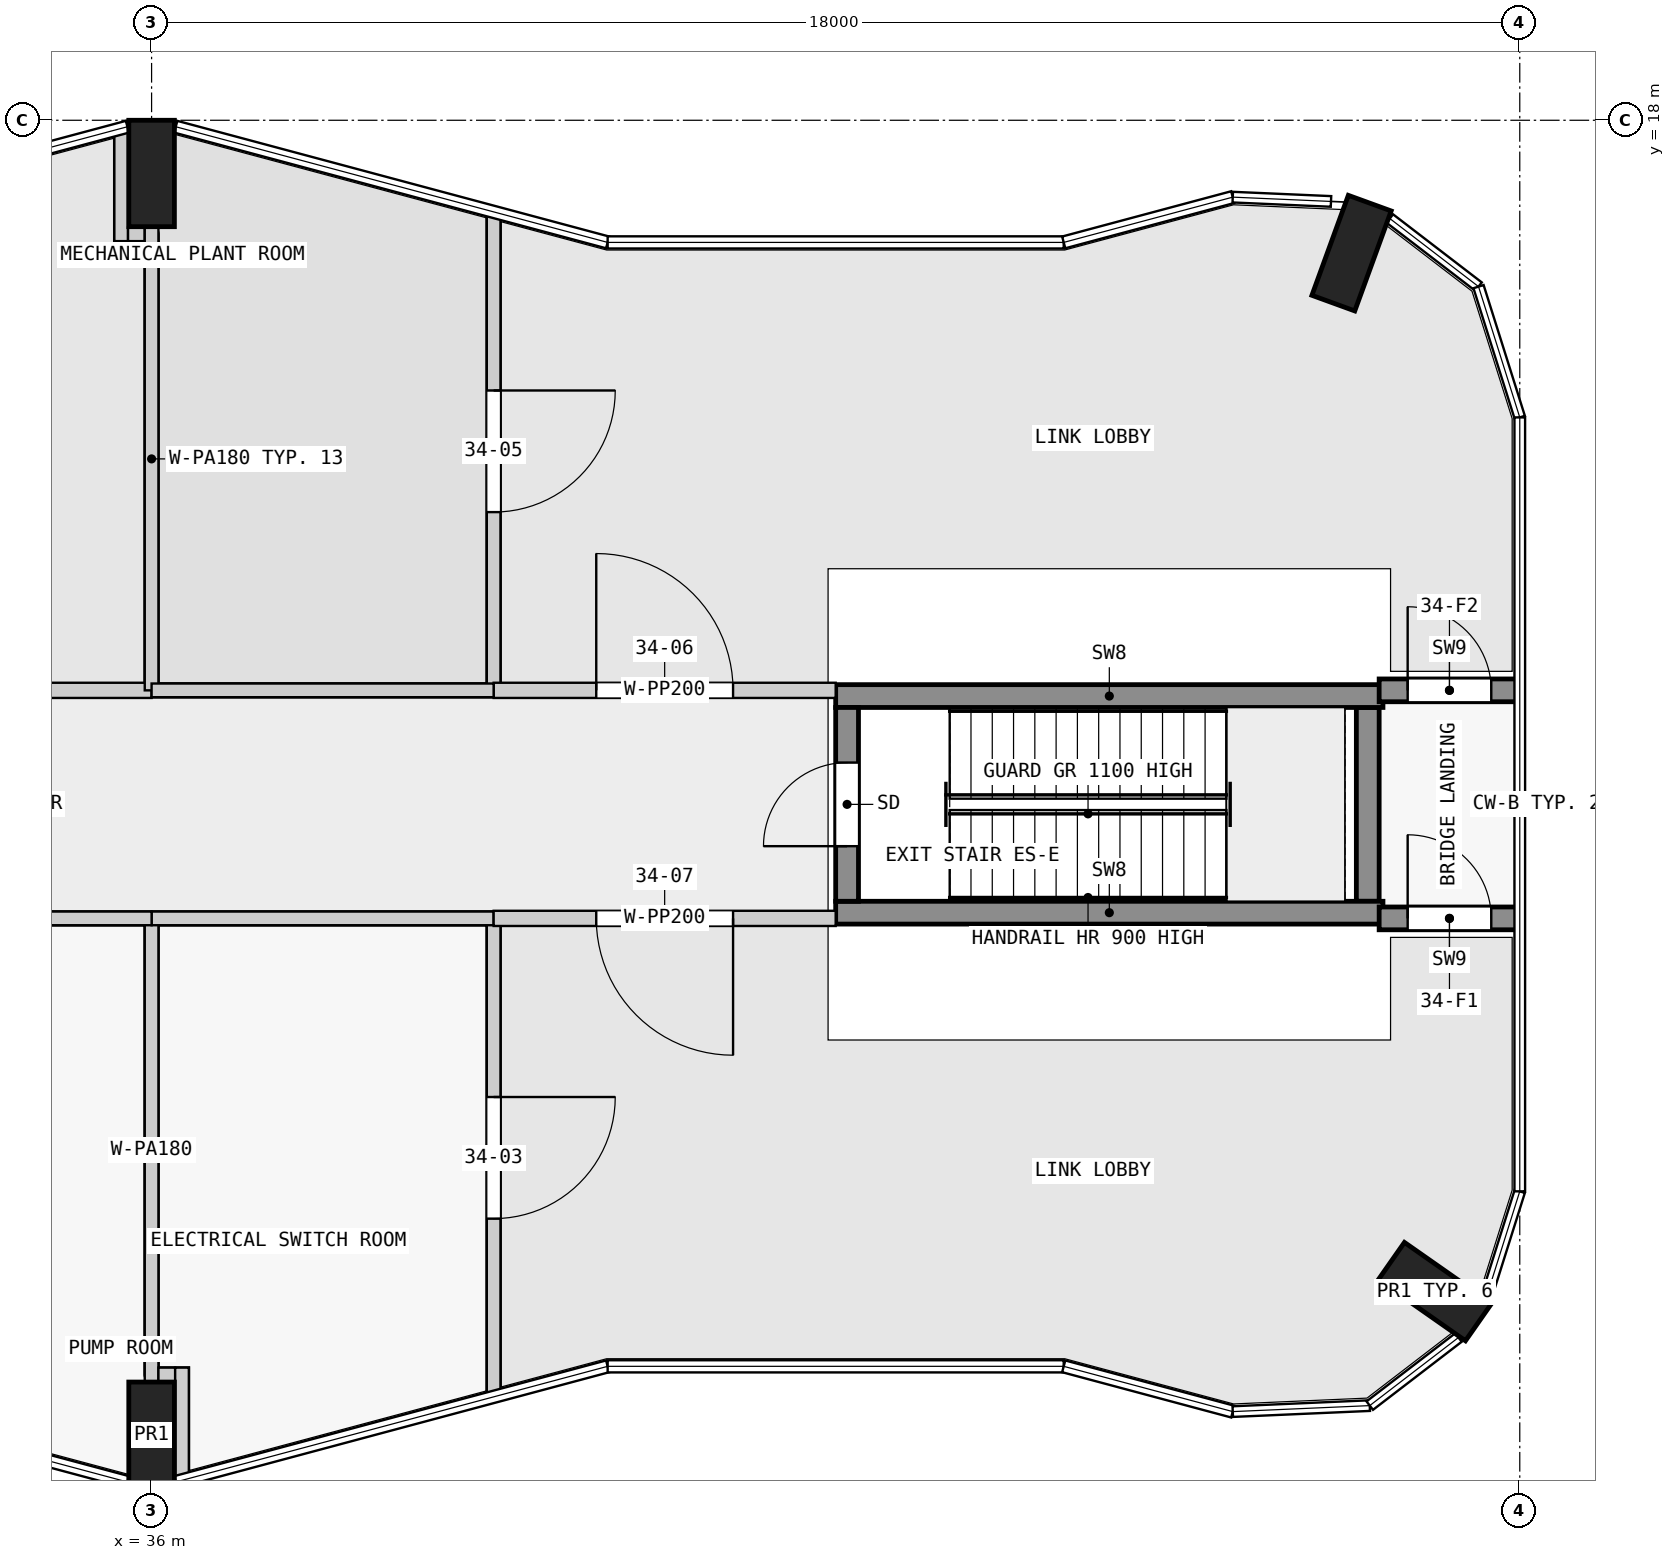
"""IFC4 building model, lengths in metres.
Left out: names, types, materials, properties, quantities, classifications, styles, units other than length and angle.
Written with IfcOpenShell. Run it as: python <this file> out.ifc"""

import sys

from ifc_helpers import new_model, si_unit, direction, frame, frame_2d, origin, origin_2d, place, context, subcontext, project, spatial, rectangle, extrude, element, fill, save


model = new_model("IFC4")
c1 = context("Model", 3, precision=1e-05, world=origin(), true_north=direction((0.0, 1.0)))
c2 = subcontext(c1, "Body", "Model", "MODEL_VIEW")
j1 = project(units=[si_unit("LENGTHUNIT", "METRE"), si_unit("PLANEANGLEUNIT", "RADIAN")], contexts=[c1])
p1 = place(None, origin())
s1 = spatial("IfcSite", under=j1, at=p1, CompositionType="ELEMENT")
p2 = place(p1, origin())
s2 = spatial("IfcBuilding", under=s1, at=p2, CompositionType="ELEMENT")
p3 = place(p2, frame((0.0, 0.0, 134.6)))
s3 = spatial("IfcBuildingStorey", under=s2, at=p3, CompositionType="ELEMENT", Elevation=134.6)
for number, where, z_axis, x_axis in (
    (1, (36.0, 0.7, 0.0), (0.0, 0.0, 1.0), (1.0, 0.0, 0.0)),
    (2, (52.884, 2.59, 0.0), (0.0, 0.0, 1.0), (0.574, 0.819, 0.0)),
    (3, (51.787, 16.252, 0.0), (0.0, 0.0, 1.0), (-0.94, 0.342, 0.0)),
    (4, (36.0, 17.3, 0.0), (0.0, 0.0, 1.0), (1.0, 0.0, 0.0)),
):
    element("IfcColumn", number, at=place(p3, frame(where, z_axis=z_axis, x_axis=x_axis)), inside=s3, PredefinedType="COLUMN", context=c2, shape_type="SweptSolid", body=[
        extrude(rectangle(XDim=0.6, YDim=1.4, at=origin_2d()), origin(), (0.0, 0.0, 1.0), 4.8),
    ])
p4 = place(p3, frame((45.15, 7.725, 0.0), z_axis=(0.0, 0.0, 1.0), x_axis=(0.0, 1.0, 0.0)))
e5 = element("IfcWall", 5, at=p4, inside=s3, PredefinedType="SHEAR", context=c2, shape_type="SweptSolid", body=[
    extrude(rectangle(XDim=2.55, YDim=0.3, at=frame_2d((1.275, 0.0))), origin(), (0.0, 0.0, 1.0), 4.8),
])
p5 = place(p4, frame((0.725, 0.0, 0.0)))
e6 = element("IfcOpeningElement", 6, at=p5, cuts=e5, PredefinedType="OPENING", context=c2, shape_type="SweptSolid", body=[
    extrude(rectangle(XDim=1.1, YDim=2.1, at=frame_2d((0.55, 1.05))), frame((0.0, 0.16, 0.0), z_axis=(0.0, -1.0, 0.0), x_axis=(1.0, 0.0, 0.0)), (0.0, 0.0, 1.0), 0.32),
])
p6 = place(p3, frame((52.0, 7.725, 0.0), z_axis=(0.0, 0.0, 1.0), x_axis=(0.0, 1.0, 0.0)))
e7 = element("IfcWall", 7, at=p6, inside=s3, PredefinedType="SHEAR", context=c2, shape_type="SweptSolid", body=[
    extrude(rectangle(XDim=2.55, YDim=0.3, at=frame_2d((1.275, 0.0))), origin(), (0.0, 0.0, 1.0), 4.8),
])
for number, where, z_axis, x_axis in (
    (8, (45.0, 7.575, 0.0), (0.0, 0.0, 1.0), (1.0, 0.0, 0.0)),
    (9, (45.0, 10.425, 0.0), (0.0, 0.0, 1.0), (1.0, 0.0, 0.0)),
):
    element("IfcWall", number, at=place(p3, frame(where, z_axis=z_axis, x_axis=x_axis)), inside=s3, PredefinedType="SHEAR", context=c2, shape_type="SweptSolid", body=[
        extrude(rectangle(XDim=7.2, YDim=0.3, at=frame_2d((3.6, 0.0))), origin(), (0.0, 0.0, 1.0), 4.8),
    ])
p7 = place(p3, frame((52.15, 7.5, 0.0), z_axis=(0.0, 0.0, 1.0), x_axis=(1.0, 0.0, 0.0)))
e10 = element("IfcWall", 10, at=p7, inside=s3, PredefinedType="SHEAR", context=c2, shape_type="SweptSolid", body=[
    extrude(rectangle(XDim=1.85, YDim=0.3, at=frame_2d((0.925, 0.0))), origin(), (0.0, 0.0, 1.0), 4.3),
])
p8 = place(p7, frame((0.375, 0.0, 0.0)))
e11 = element("IfcOpeningElement", 11, at=p8, cuts=e10, PredefinedType="OPENING", context=c2, shape_type="SweptSolid", body=[
    extrude(rectangle(XDim=1.1, YDim=2.1, at=frame_2d((0.55, 1.05))), frame((0.0, 0.16, 0.0), z_axis=(0.0, -1.0, 0.0), x_axis=(1.0, 0.0, 0.0)), (0.0, 0.0, 1.0), 0.32),
])
p9 = place(p3, frame((52.15, 10.5, 0.0), z_axis=(0.0, 0.0, 1.0), x_axis=(1.0, 0.0, 0.0)))
e12 = element("IfcWall", 12, at=p9, inside=s3, PredefinedType="SHEAR", context=c2, shape_type="SweptSolid", body=[
    extrude(rectangle(XDim=1.85, YDim=0.3, at=frame_2d((0.925, 0.0))), origin(), (0.0, 0.0, 1.0), 4.3),
])
p10 = place(p9, frame((0.375, 0.0, 0.0)))
e13 = element("IfcOpeningElement", 13, at=p10, cuts=e12, PredefinedType="OPENING", context=c2, shape_type="SweptSolid", body=[
    extrude(rectangle(XDim=1.1, YDim=2.1, at=frame_2d((0.55, 1.05))), frame((0.0, 0.16, 0.0), z_axis=(0.0, -1.0, 0.0), x_axis=(1.0, 0.0, 0.0)), (0.0, 0.0, 1.0), 0.32),
])
p11 = place(p3, frame((22.5, 10.5, 0.0), z_axis=(0.0, 0.0, 1.0), x_axis=(1.0, 0.0, 0.0)))
e14 = element("IfcWall", 14, at=p11, inside=s3, PredefinedType="PARTITIONING", context=c2, shape_type="SweptSolid", body=[
    extrude(rectangle(XDim=13.5, YDim=0.2, at=frame_2d((6.75, 0.0))), origin(), (0.0, 0.0, 1.0), 4.3),
])
p12 = place(p11, frame((6.1, 0.0, 0.0)))
e15 = element("IfcOpeningElement", 15, at=p12, cuts=e14, PredefinedType="OPENING", context=c2, shape_type="SweptSolid", body=[
    extrude(rectangle(XDim=1.1, YDim=2.1, at=frame_2d((0.55, 1.05))), frame((0.0, 0.11, 0.0), z_axis=(0.0, -1.0, 0.0), x_axis=(1.0, 0.0, 0.0)), (0.0, 0.0, 1.0), 0.22),
])
p13 = place(p3, frame((36.0, 7.5, 0.0), z_axis=(0.0, 0.0, 1.0), x_axis=(0.0, -1.0, 0.0)))
e16 = element("IfcWall", 16, at=p13, inside=s3, PredefinedType="PARTITIONING", context=c2, shape_type="SweptSolid", body=[
    extrude(rectangle(XDim=6.09, YDim=0.18, at=frame_2d((3.045, 0.0))), origin(), (0.0, 0.0, 1.0), 4.3),
])
p14 = place(p3, frame((36.09, 1.5, 0.0), z_axis=(0.0, 0.0, 1.0), x_axis=(1.0, 0.0, 0.0)))
e17 = element("IfcWall", 17, at=p14, inside=s3, PredefinedType="PARTITIONING", context=c2, shape_type="SweptSolid", body=[
    extrude(rectangle(XDim=0.22, YDim=0.18, at=frame_2d((0.11, 0.0))), origin(), (0.0, 0.0, 1.0), 4.3),
])
for number, where, z_axis, x_axis in (
    (18, (36.4, 1.59, 0.0), (0.0, 0.0, 1.0), (0.0, -1.0, 0.0)),
    (19, (35.6, 17.893, 0.0), (0.0, 0.0, 1.0), (0.0, -1.0, 0.0)),
):
    element("IfcWall", number, at=place(p3, frame(where, z_axis=z_axis, x_axis=x_axis)), inside=s3, PredefinedType="PARTITIONING", context=c2, shape_type="SweptSolid", body=[
        extrude(rectangle(XDim=1.483, YDim=0.18, at=frame_2d((0.742, 0.0))), origin(), (0.0, 0.0, 1.0), 4.3),
    ])
p15 = place(p3, frame((35.69, 16.5, 0.0), z_axis=(0.0, 0.0, 1.0), x_axis=(1.0, 0.0, 0.0)))
e20 = element("IfcWall", 20, at=p15, inside=s3, PredefinedType="PARTITIONING", context=c2, shape_type="SweptSolid", body=[
    extrude(rectangle(XDim=0.22, YDim=0.18, at=frame_2d((0.11, 0.0))), origin(), (0.0, 0.0, 1.0), 4.3),
])
p16 = place(p3, frame((36.0, 16.59, 0.0), z_axis=(0.0, 0.0, 1.0), x_axis=(0.0, -1.0, 0.0)))
e21 = element("IfcWall", 21, at=p16, inside=s3, PredefinedType="PARTITIONING", context=c2, shape_type="SweptSolid", body=[
    extrude(rectangle(XDim=6.09, YDim=0.18, at=frame_2d((3.045, 0.0))), origin(), (0.0, 0.0, 1.0), 4.3),
])
p17 = place(p3, frame((40.5, 7.5, 0.0), z_axis=(0.0, 0.0, 1.0), x_axis=(0.0, -1.0, 0.0)))
e22 = element("IfcWall", 22, at=p17, inside=s3, PredefinedType="PARTITIONING", context=c2, shape_type="SweptSolid", body=[
    extrude(rectangle(XDim=6.295, YDim=0.18, at=frame_2d((3.147, 0.0))), origin(), (0.0, 0.0, 1.0), 4.3),
])
p18 = place(p17, frame((2.35, 0.0, 0.0)))
e23 = element("IfcOpeningElement", 23, at=p18, cuts=e22, PredefinedType="OPENING", context=c2, shape_type="SweptSolid", body=[
    extrude(rectangle(XDim=1.6, YDim=2.4, at=frame_2d((0.8, 1.2))), frame((0.0, 0.1, 0.0), z_axis=(0.0, -1.0, 0.0), x_axis=(1.0, 0.0, 0.0)), (0.0, 0.0, 1.0), 0.2),
])
p19 = place(p3, frame((40.5, 16.795, 0.0), z_axis=(0.0, 0.0, 1.0), x_axis=(0.0, -1.0, 0.0)))
e24 = element("IfcWall", 24, at=p19, inside=s3, PredefinedType="PARTITIONING", context=c2, shape_type="SweptSolid", body=[
    extrude(rectangle(XDim=6.295, YDim=0.18, at=frame_2d((3.147, 0.0))), origin(), (0.0, 0.0, 1.0), 4.3),
])
p20 = place(p19, frame((2.35, 0.0, 0.0)))
e25 = element("IfcOpeningElement", 25, at=p20, cuts=e24, PredefinedType="OPENING", context=c2, shape_type="SweptSolid", body=[
    extrude(rectangle(XDim=1.6, YDim=2.4, at=frame_2d((0.8, 1.2))), frame((0.0, 0.1, 0.0), z_axis=(0.0, -1.0, 0.0), x_axis=(1.0, 0.0, 0.0)), (0.0, 0.0, 1.0), 0.2),
])
p21 = place(p3, frame((40.5, 7.5, 0.0), z_axis=(0.0, 0.0, 1.0), x_axis=(-1.0, 0.0, 0.0)))
e26 = element("IfcWall", 26, at=p21, inside=s3, PredefinedType="PARTITIONING", context=c2, shape_type="SweptSolid", body=[
    extrude(rectangle(XDim=4.5, YDim=0.18, at=frame_2d((2.25, 0.0))), origin(), (0.0, 0.0, 1.0), 4.3),
])
p22 = place(p3, frame((40.5, 10.5, 0.0), z_axis=(0.0, 0.0, 1.0), x_axis=(1.0, 0.0, 0.0)))
e27 = element("IfcWall", 27, at=p22, inside=s3, PredefinedType="PARTITIONING", context=c2, shape_type="SweptSolid", body=[
    extrude(rectangle(XDim=4.5, YDim=0.2, at=frame_2d((2.25, 0.0))), origin(), (0.0, 0.0, 1.0), 4.3),
])
p23 = place(p22, frame((1.35, 0.0, 0.0)))
e28 = element("IfcOpeningElement", 28, at=p23, cuts=e27, PredefinedType="OPENING", context=c2, shape_type="SweptSolid", body=[
    extrude(rectangle(XDim=1.8, YDim=2.1, at=frame_2d((0.9, 1.05))), frame((0.0, 0.11, 0.0), z_axis=(0.0, -1.0, 0.0), x_axis=(1.0, 0.0, 0.0)), (0.0, 0.0, 1.0), 0.22),
])
p24 = place(p3, frame((36.0, 10.5, 0.0), z_axis=(0.0, 0.0, 1.0), x_axis=(1.0, 0.0, 0.0)))
e29 = element("IfcWall", 29, at=p24, inside=s3, PredefinedType="PARTITIONING", context=c2, shape_type="SweptSolid", body=[
    extrude(rectangle(XDim=4.5, YDim=0.18, at=frame_2d((2.25, 0.0))), origin(), (0.0, 0.0, 1.0), 4.3),
])
p25 = place(p3, frame((36.0, 7.5, 0.0), z_axis=(0.0, 0.0, 1.0), x_axis=(-1.0, 0.0, 0.0)))
e30 = element("IfcWall", 30, at=p25, inside=s3, PredefinedType="PARTITIONING", context=c2, shape_type="SweptSolid", body=[
    extrude(rectangle(XDim=4.5, YDim=0.18, at=frame_2d((2.25, 0.0))), origin(), (0.0, 0.0, 1.0), 4.3),
])
p26 = place(p25, frame((1.35, 0.0, 0.0)))
e31 = element("IfcOpeningElement", 31, at=p26, cuts=e30, PredefinedType="OPENING", context=c2, shape_type="SweptSolid", body=[
    extrude(rectangle(XDim=1.6, YDim=2.4, at=frame_2d((0.8, 1.2))), frame((0.0, 0.1, 0.0), z_axis=(0.0, -1.0, 0.0), x_axis=(1.0, 0.0, 0.0)), (0.0, 0.0, 1.0), 0.2),
])
p27 = place(p3, frame((45.0, 7.5, 0.0), z_axis=(0.0, 0.0, 1.0), x_axis=(-1.0, 0.0, 0.0)))
e32 = element("IfcWall", 32, at=p27, inside=s3, PredefinedType="PARTITIONING", context=c2, shape_type="SweptSolid", body=[
    extrude(rectangle(XDim=4.5, YDim=0.2, at=frame_2d((2.25, 0.0))), origin(), (0.0, 0.0, 1.0), 4.3),
])
p28 = place(p27, frame((1.35, 0.0, 0.0)))
e33 = element("IfcOpeningElement", 33, at=p28, cuts=e32, PredefinedType="OPENING", context=c2, shape_type="SweptSolid", body=[
    extrude(rectangle(XDim=1.8, YDim=2.1, at=frame_2d((0.9, 1.05))), frame((0.0, 0.11, 0.0), z_axis=(0.0, -1.0, 0.0), x_axis=(1.0, 0.0, 0.0)), (0.0, 0.0, 1.0), 0.22),
])
p29 = place(p5, origin())
e34 = element("IfcDoor", 34, at=p29, inside=s3, OperationType="SINGLE_SWING_LEFT", PredefinedType="DOOR", context=c2, shape_type="SweptSolid", body=[
    extrude(rectangle(XDim=1.1, YDim=2.1, at=frame_2d((0.55, 1.05))), frame((0.0, 0.025, 0.0), z_axis=(0.0, -1.0, 0.0), x_axis=(1.0, 0.0, 0.0)), (0.0, 0.0, 1.0), 0.05),
])
fill(e6, e34)
p30 = place(p18, origin())
e35 = element("IfcDoor", 35, at=p30, inside=s3, OperationType="SINGLE_SWING_LEFT", PredefinedType="DOOR", context=c2, shape_type="SweptSolid", body=[
    extrude(rectangle(XDim=1.6, YDim=2.4, at=frame_2d((0.8, 1.2))), frame((0.0, 0.025, 0.0), z_axis=(0.0, -1.0, 0.0), x_axis=(1.0, 0.0, 0.0)), (0.0, 0.0, 1.0), 0.05),
])
fill(e23, e35)
p31 = place(p20, origin())
e36 = element("IfcDoor", 36, at=p31, inside=s3, OperationType="SINGLE_SWING_LEFT", PredefinedType="DOOR", context=c2, shape_type="SweptSolid", body=[
    extrude(rectangle(XDim=1.6, YDim=2.4, at=frame_2d((0.8, 1.2))), frame((0.0, 0.025, 0.0), z_axis=(0.0, -1.0, 0.0), x_axis=(1.0, 0.0, 0.0)), (0.0, 0.0, 1.0), 0.05),
])
fill(e25, e36)
p32 = place(p23, origin())
e37 = element("IfcDoor", 37, at=p32, inside=s3, OperationType="DOUBLE_DOOR_SINGLE_SWING", PredefinedType="DOOR", context=c2, shape_type="SweptSolid", body=[
    extrude(rectangle(XDim=1.8, YDim=2.1, at=frame_2d((0.9, 1.05))), frame((0.0, 0.025, 0.0), z_axis=(0.0, -1.0, 0.0), x_axis=(1.0, 0.0, 0.0)), (0.0, 0.0, 1.0), 0.05),
])
fill(e28, e37)
p33 = place(p28, origin())
e38 = element("IfcDoor", 38, at=p33, inside=s3, OperationType="DOUBLE_DOOR_SINGLE_SWING", PredefinedType="DOOR", context=c2, shape_type="SweptSolid", body=[
    extrude(rectangle(XDim=1.8, YDim=2.1, at=frame_2d((0.9, 1.05))), frame((0.0, 0.025, 0.0), z_axis=(0.0, -1.0, 0.0), x_axis=(1.0, 0.0, 0.0)), (0.0, 0.0, 1.0), 0.05),
])
fill(e33, e38)
p34 = place(p8, origin())
e39 = element("IfcDoor", 39, at=p34, inside=s3, OperationType="SINGLE_SWING_LEFT", PredefinedType="DOOR", context=c2, shape_type="SweptSolid", body=[
    extrude(rectangle(XDim=1.1, YDim=2.1, at=frame_2d((0.55, 1.05))), frame((0.0, 0.025, 0.0), z_axis=(0.0, -1.0, 0.0), x_axis=(1.0, 0.0, 0.0)), (0.0, 0.0, 1.0), 0.05),
])
fill(e11, e39)
p35 = place(p10, origin())
e40 = element("IfcDoor", 40, at=p35, inside=s3, OperationType="SINGLE_SWING_LEFT", PredefinedType="DOOR", context=c2, shape_type="SweptSolid", body=[
    extrude(rectangle(XDim=1.1, YDim=2.1, at=frame_2d((0.55, 1.05))), frame((0.0, 0.025, 0.0), z_axis=(0.0, -1.0, 0.0), x_axis=(1.0, 0.0, 0.0)), (0.0, 0.0, 1.0), 0.05),
])
fill(e13, e40)
save(model, sys.argv[1])
